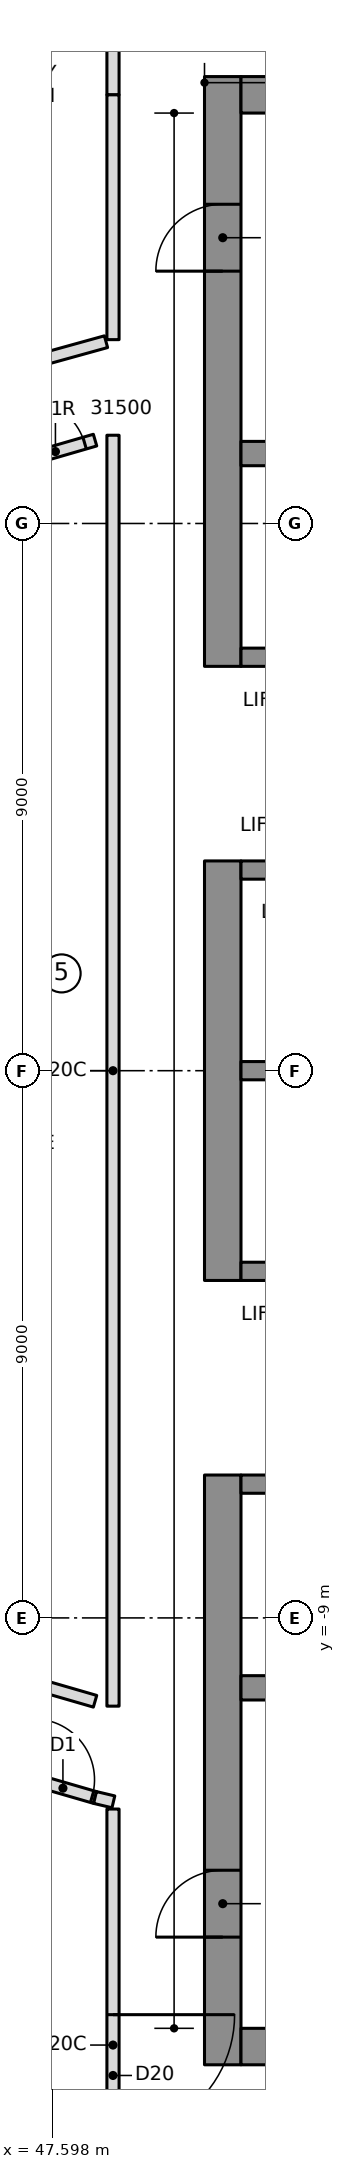
"""IFC4 building model, lengths in metres.
Left out: names, types, materials, properties, quantities, classifications, styles, units other than length and angle.
Written with IfcOpenShell. Run it as: python <this file> out.ifc"""

import sys

from ifc_helpers import new_model, si_unit, direction, frame, frame_2d, origin, place, context, subcontext, project, spatial, rectangle, extrude, element, fill, save


model = new_model("IFC4")
c1 = context("Model", 3, precision=1e-05, world=origin(), true_north=direction((0.0, 1.0)))
c2 = subcontext(c1, "Body", "Model", "MODEL_VIEW")
j1 = project(units=[si_unit("LENGTHUNIT", "METRE"), si_unit("PLANEANGLEUNIT", "RADIAN")], contexts=[c1])
p1 = place(None, origin())
s1 = spatial("IfcSite", under=j1, at=p1, CompositionType="ELEMENT")
p2 = place(p1, origin())
s2 = spatial("IfcBuilding", under=s1, at=p2, CompositionType="ELEMENT")
p3 = place(p2, frame((0.0, 0.0, 216.2)))
s3 = spatial("IfcBuildingStorey", under=s2, at=p3, CompositionType="ELEMENT", Elevation=216.2)
p4 = place(p3, frame((50.4, 6.65, 0.0), z_axis=(0.0, 0.0, 1.0), x_axis=(0.0, 1.0, 0.0)))
e1 = element("IfcWall", 1, at=p4, inside=s3, PredefinedType="SHEAR", context=c2, shape_type="SweptSolid", body=[
    extrude(rectangle(XDim=9.7, YDim=0.6, at=frame_2d((4.85, 0.0))), origin(), (0.0, 0.0, 1.0), 4.6),
])
p5 = place(p4, frame((6.5, 0.0, 0.0)))
e2 = element("IfcOpeningElement", 2, at=p5, cuts=e1, PredefinedType="OPENING", context=c2, shape_type="SweptSolid", body=[
    extrude(rectangle(XDim=1.1, YDim=2.1, at=frame_2d((0.55, 1.05))), frame((0.0, 0.31, 0.0), z_axis=(0.0, -1.0, 0.0), x_axis=(1.0, 0.0, 0.0)), (0.0, 0.0, 1.0), 0.62),
])
p6 = place(p3, frame((50.4, -3.45, 0.0), z_axis=(0.0, 0.0, 1.0), x_axis=(0.0, 1.0, 0.0)))
e3 = element("IfcWall", 3, at=p6, inside=s3, PredefinedType="SHEAR", context=c2, shape_type="SweptSolid", body=[
    extrude(rectangle(XDim=6.9, YDim=0.6, at=frame_2d((3.45, 0.0))), origin(), (0.0, 0.0, 1.0), 4.6),
])
p7 = place(p3, frame((50.4, -16.35, 0.0), z_axis=(0.0, 0.0, 1.0), x_axis=(0.0, 1.0, 0.0)))
e4 = element("IfcWall", 4, at=p7, inside=s3, PredefinedType="SHEAR", context=c2, shape_type="SweptSolid", body=[
    extrude(rectangle(XDim=9.7, YDim=0.6, at=frame_2d((4.85, 0.0))), origin(), (0.0, 0.0, 1.0), 4.6),
])
p8 = place(p7, frame((2.1, 0.0, 0.0)))
e5 = element("IfcOpeningElement", 5, at=p8, cuts=e4, PredefinedType="OPENING", context=c2, shape_type="SweptSolid", body=[
    extrude(rectangle(XDim=1.1, YDim=2.1, at=frame_2d((0.55, 1.05))), frame((0.0, 0.31, 0.0), z_axis=(0.0, -1.0, 0.0), x_axis=(1.0, 0.0, 0.0)), (0.0, 0.0, 1.0), 0.62),
])
for number, where, z_axis, x_axis in (
    (6, (50.7, 16.05, 0.0), (0.0, 0.0, 1.0), (1.0, 0.0, 0.0)),
    (7, (50.7, -16.05, 0.0), (0.0, 0.0, 1.0), (1.0, 0.0, 0.0)),
):
    element("IfcWall", number, at=place(p3, frame(where, z_axis=z_axis, x_axis=x_axis)), inside=s3, PredefinedType="SHEAR", context=c2, shape_type="SweptSolid", body=[
        extrude(rectangle(XDim=13.62, YDim=0.6, at=frame_2d((6.81, 0.0))), origin(), (0.0, 0.0, 1.0), 4.6),
    ])
p9 = place(p3, frame((50.7, 10.15, 0.0), z_axis=(0.0, 0.0, 1.0), x_axis=(1.0, 0.0, 0.0)))
e8 = element("IfcWall", 8, at=p9, inside=s3, PredefinedType="SHEAR", context=c2, shape_type="SweptSolid", body=[
    extrude(rectangle(XDim=13.02, YDim=0.4, at=frame_2d((6.51, 0.0))), origin(), (0.0, 0.0, 1.0), 4.6),
])
p10 = place(p9, frame((0.7, 0.0, 0.0)))
e9 = element("IfcOpeningElement", 9, at=p10, cuts=e8, PredefinedType="OPENING", context=c2, shape_type="SweptSolid", body=[
    extrude(rectangle(XDim=1.1, YDim=2.1, at=frame_2d((0.55, 1.05))), frame((0.0, 0.21, 0.0), z_axis=(0.0, -1.0, 0.0), x_axis=(1.0, 0.0, 0.0)), (0.0, 0.0, 1.0), 0.42),
])
p11 = place(p9, frame((3.5, 0.0, 0.0)))
e10 = element("IfcOpeningElement", 10, at=p11, cuts=e8, PredefinedType="OPENING", context=c2, shape_type="SweptSolid", body=[
    extrude(rectangle(XDim=1.1, YDim=2.1, at=frame_2d((0.55, 1.05))), frame((0.0, 0.21, 0.0), z_axis=(0.0, -1.0, 0.0), x_axis=(1.0, 0.0, 0.0)), (0.0, 0.0, 1.0), 0.42),
])
p12 = place(p3, frame((50.7, -10.15, 0.0), z_axis=(0.0, 0.0, 1.0), x_axis=(1.0, 0.0, 0.0)))
e11 = element("IfcWall", 11, at=p12, inside=s3, PredefinedType="SHEAR", context=c2, shape_type="SweptSolid", body=[
    extrude(rectangle(XDim=13.02, YDim=0.4, at=frame_2d((6.51, 0.0))), origin(), (0.0, 0.0, 1.0), 4.6),
])
p13 = place(p3, frame((50.7, 0.0, 0.0), z_axis=(0.0, 0.0, 1.0), x_axis=(1.0, 0.0, 0.0)))
e12 = element("IfcWall", 12, at=p13, inside=s3, PredefinedType="SHEAR", context=c2, shape_type="SweptSolid", body=[
    extrude(rectangle(XDim=10.9, YDim=0.3, at=frame_2d((5.45, 0.0))), origin(), (0.0, 0.0, 1.0), 4.6),
])
p14 = place(p3, frame((50.7, 3.3, 0.0), z_axis=(0.0, 0.0, 1.0), x_axis=(1.0, 0.0, 0.0)))
e13 = element("IfcWall", 13, at=p14, inside=s3, PredefinedType="SHEAR", context=c2, shape_type="SweptSolid", body=[
    extrude(rectangle(XDim=10.9, YDim=0.3, at=frame_2d((5.45, 0.0))), origin(), (0.0, 0.0, 1.0), 4.6),
])
p15 = place(p14, frame((0.7, 0.0, 0.0)))
e14 = element("IfcOpeningElement", 14, at=p15, cuts=e13, PredefinedType="OPENING", context=c2, shape_type="SweptSolid", body=[
    extrude(rectangle(XDim=1.1, YDim=2.1, at=frame_2d((0.55, 1.05))), frame((0.0, 0.16, 0.0), z_axis=(0.0, -1.0, 0.0), x_axis=(1.0, 0.0, 0.0)), (0.0, 0.0, 1.0), 0.32),
])
p16 = place(p14, frame((3.5, 0.0, 0.0)))
e15 = element("IfcOpeningElement", 15, at=p16, cuts=e13, PredefinedType="OPENING", context=c2, shape_type="SweptSolid", body=[
    extrude(rectangle(XDim=1.1, YDim=2.1, at=frame_2d((0.55, 1.05))), frame((0.0, 0.16, 0.0), z_axis=(0.0, -1.0, 0.0), x_axis=(1.0, 0.0, 0.0)), (0.0, 0.0, 1.0), 0.32),
])
p17 = place(p14, frame((6.3, 0.0, 0.0)))
e16 = element("IfcOpeningElement", 16, at=p17, cuts=e13, PredefinedType="OPENING", context=c2, shape_type="SweptSolid", body=[
    extrude(rectangle(XDim=1.1, YDim=2.1, at=frame_2d((0.55, 1.05))), frame((0.0, 0.16, 0.0), z_axis=(0.0, -1.0, 0.0), x_axis=(1.0, 0.0, 0.0)), (0.0, 0.0, 1.0), 0.32),
])
p18 = place(p14, frame((9.1, 0.0, 0.0)))
e17 = element("IfcOpeningElement", 17, at=p18, cuts=e13, PredefinedType="OPENING", context=c2, shape_type="SweptSolid", body=[
    extrude(rectangle(XDim=1.1, YDim=2.1, at=frame_2d((0.55, 1.05))), frame((0.0, 0.16, 0.0), z_axis=(0.0, -1.0, 0.0), x_axis=(1.0, 0.0, 0.0)), (0.0, 0.0, 1.0), 0.32),
])
p19 = place(p3, frame((50.7, 6.8, 0.0), z_axis=(0.0, 0.0, 1.0), x_axis=(1.0, 0.0, 0.0)))
e18 = element("IfcWall", 18, at=p19, inside=s3, PredefinedType="SHEAR", context=c2, shape_type="SweptSolid", body=[
    extrude(rectangle(XDim=10.9, YDim=0.3, at=frame_2d((5.45, 0.0))), origin(), (0.0, 0.0, 1.0), 4.6),
])
p20 = place(p19, frame((6.4, 0.0, 0.0)))
e19 = element("IfcOpeningElement", 19, at=p20, cuts=e18, PredefinedType="OPENING", context=c2, shape_type="SweptSolid", body=[
    extrude(rectangle(XDim=0.9, YDim=2.1, at=frame_2d((0.45, 1.05))), frame((0.0, 0.16, 0.0), z_axis=(0.0, -1.0, 0.0), x_axis=(1.0, 0.0, 0.0)), (0.0, 0.0, 1.0), 0.32),
])
p21 = place(p19, frame((9.2, 0.0, 0.0)))
e20 = element("IfcOpeningElement", 20, at=p21, cuts=e18, PredefinedType="OPENING", context=c2, shape_type="SweptSolid", body=[
    extrude(rectangle(XDim=0.9, YDim=2.1, at=frame_2d((0.45, 1.05))), frame((0.0, 0.16, 0.0), z_axis=(0.0, -1.0, 0.0), x_axis=(1.0, 0.0, 0.0)), (0.0, 0.0, 1.0), 0.32),
])
p22 = place(p3, frame((50.7, -3.3, 0.0), z_axis=(0.0, 0.0, 1.0), x_axis=(1.0, 0.0, 0.0)))
e21 = element("IfcWall", 21, at=p22, inside=s3, PredefinedType="SHEAR", context=c2, shape_type="SweptSolid", body=[
    extrude(rectangle(XDim=10.9, YDim=0.3, at=frame_2d((5.45, 0.0))), origin(), (0.0, 0.0, 1.0), 4.6),
])
p23 = place(p22, frame((9.1, 0.0, 0.0)))
e22 = element("IfcOpeningElement", 22, at=p23, cuts=e21, PredefinedType="OPENING", context=c2, shape_type="SweptSolid", body=[
    extrude(rectangle(XDim=1.1, YDim=2.1, at=frame_2d((0.55, 1.05))), frame((0.0, 0.16, 0.0), z_axis=(0.0, -1.0, 0.0), x_axis=(1.0, 0.0, 0.0)), (0.0, 0.0, 1.0), 0.32),
])
p24 = place(p3, frame((50.7, -6.8, 0.0), z_axis=(0.0, 0.0, 1.0), x_axis=(1.0, 0.0, 0.0)))
e23 = element("IfcWall", 23, at=p24, inside=s3, PredefinedType="SHEAR", context=c2, shape_type="SweptSolid", body=[
    extrude(rectangle(XDim=10.9, YDim=0.3, at=frame_2d((5.45, 0.0))), origin(), (0.0, 0.0, 1.0), 4.6),
])
p25 = place(p24, frame((6.3, 0.0, 0.0)))
e24 = element("IfcOpeningElement", 24, at=p25, cuts=e23, PredefinedType="OPENING", context=c2, shape_type="SweptSolid", body=[
    extrude(rectangle(XDim=1.1, YDim=2.1, at=frame_2d((0.55, 1.05))), frame((0.0, 0.16, 0.0), z_axis=(0.0, -1.0, 0.0), x_axis=(1.0, 0.0, 0.0)), (0.0, 0.0, 1.0), 0.32),
])
p26 = place(p24, frame((9.1, 0.0, 0.0)))
e25 = element("IfcOpeningElement", 25, at=p26, cuts=e23, PredefinedType="OPENING", context=c2, shape_type="SweptSolid", body=[
    extrude(rectangle(XDim=1.1, YDim=2.1, at=frame_2d((0.55, 1.05))), frame((0.0, 0.16, 0.0), z_axis=(0.0, -1.0, 0.0), x_axis=(1.0, 0.0, 0.0)), (0.0, 0.0, 1.0), 0.32),
])
p27 = place(p24, frame((0.8, 0.0, 0.0)))
e26 = element("IfcOpeningElement", 26, at=p27, cuts=e23, PredefinedType="OPENING", context=c2, shape_type="SweptSolid", body=[
    extrude(rectangle(XDim=0.9, YDim=2.1, at=frame_2d((0.45, 1.05))), frame((0.0, 0.16, 0.0), z_axis=(0.0, -1.0, 0.0), x_axis=(1.0, 0.0, 0.0)), (0.0, 0.0, 1.0), 0.32),
])
p28 = place(p24, frame((3.6, 0.0, 0.0)))
e27 = element("IfcOpeningElement", 27, at=p28, cuts=e23, PredefinedType="OPENING", context=c2, shape_type="SweptSolid", body=[
    extrude(rectangle(XDim=0.9, YDim=2.1, at=frame_2d((0.45, 1.05))), frame((0.0, 0.16, 0.0), z_axis=(0.0, -1.0, 0.0), x_axis=(1.0, 0.0, 0.0)), (0.0, 0.0, 1.0), 0.32),
])
p29 = place(p3, frame((47.23, -11.643, 0.0), z_axis=(0.0, 0.0, 1.0), x_axis=(0.960450233741, -0.278451698696, 0.0)))
e28 = element("IfcWall", 28, at=p29, inside=s3, PredefinedType="PARTITIONING", context=c2, shape_type="SweptSolid", body=[
    extrude(rectangle(XDim=1.115, YDim=0.2, at=frame_2d((0.557, 0.0))), origin(), (0.0, 0.0, 1.0), 4.3),
])
p30 = place(p29, frame((0.064, 0.0, 0.0)))
e29 = element("IfcOpeningElement", 29, at=p30, cuts=e28, PredefinedType="OPENING", context=c2, shape_type="SweptSolid", body=[
    extrude(rectangle(XDim=1.0, YDim=2.1, at=frame_2d((0.5, 1.05))), frame((0.0, 0.11, 0.0), z_axis=(0.0, -1.0, 0.0), x_axis=(1.0, 0.0, 0.0)), (0.0, 0.0, 1.0), 0.22),
])
p31 = place(p3, frame((46.997, 9.993, 0.0), z_axis=(0.0, 0.0, 1.0), x_axis=(0.960450321583, 0.278451395706, 0.0)))
e30 = element("IfcWall", 30, at=p31, inside=s3, PredefinedType="PARTITIONING", context=c2, shape_type="SweptSolid", body=[
    extrude(rectangle(XDim=1.356, YDim=0.2, at=frame_2d((0.678, 0.0))), origin(), (0.0, 0.0, 1.0), 4.3),
])
p32 = place(p31, frame((0.178, 0.0, 0.0)))
e31 = element("IfcOpeningElement", 31, at=p32, cuts=e30, PredefinedType="OPENING", context=c2, shape_type="SweptSolid", body=[
    extrude(rectangle(XDim=1.0, YDim=2.1, at=frame_2d((0.5, 1.05))), frame((0.0, 0.11, 0.0), z_axis=(0.0, -1.0, 0.0), x_axis=(1.0, 0.0, 0.0)), (0.0, 0.0, 1.0), 0.22),
])
p33 = place(p3, frame((48.3, -10.371, 0.0), z_axis=(0.0, 0.0, 1.0), x_axis=(-0.960450321583, 0.278451395706, 0.0)))
e32 = element("IfcWall", 32, at=p33, inside=s3, PredefinedType="PARTITIONING", context=c2, shape_type="SweptSolid", body=[
    extrude(rectangle(XDim=1.356, YDim=0.2, at=frame_2d((0.678, 0.0))), origin(), (0.0, 0.0, 1.0), 4.3),
])
p34 = place(p3, frame((48.595, 19.927, 0.0), z_axis=(0.0, 0.0, 1.0), x_axis=(0.0, -1.0, 0.0)))
e33 = element("IfcWall", 33, at=p34, inside=s3, PredefinedType="PARTITIONING", context=c2, shape_type="SweptSolid", body=[
    extrude(rectangle(XDim=3.877, YDim=0.2, at=frame_2d((1.938, 0.0))), origin(), (0.0, 0.0, 1.0), 4.3),
])
p35 = place(p34, frame((1.601, 0.0, 0.0)))
e34 = element("IfcOpeningElement", 34, at=p35, cuts=e33, PredefinedType="OPENING", context=c2, shape_type="SweptSolid", body=[
    extrude(rectangle(XDim=1.0, YDim=2.1, at=frame_2d((0.5, 1.05))), frame((0.0, 0.11, 0.0), z_axis=(0.0, -1.0, 0.0), x_axis=(1.0, 0.0, 0.0)), (0.0, 0.0, 1.0), 0.22),
])
p36 = place(p3, frame((48.595, 10.451, 0.0), z_axis=(0.0, 0.0, 1.0), x_axis=(0.0, -1.0, 0.0)))
e35 = element("IfcWall", 35, at=p36, inside=s3, PredefinedType="PARTITIONING", context=c2, shape_type="SweptSolid", body=[
    extrude(rectangle(XDim=20.903, YDim=0.2, at=frame_2d((10.451, 0.0))), origin(), (0.0, 0.0, 1.0), 4.3),
])
p37 = place(p3, frame((48.595, 16.05, 0.0), z_axis=(0.0, 0.0, 1.0), x_axis=(0.0, -1.0, 0.0)))
e36 = element("IfcWall", 36, at=p37, inside=s3, PredefinedType="PARTITIONING", context=c2, shape_type="SweptSolid", body=[
    extrude(rectangle(XDim=4.026, YDim=0.2, at=frame_2d((2.013, 0.0))), origin(), (0.0, 0.0, 1.0), 4.3),
])
p38 = place(p3, frame((48.48, 11.99, 0.0), z_axis=(0.0, 0.0, 1.0), x_axis=(-0.963687566022, -0.267032348406, 0.0)))
e37 = element("IfcWall", 37, at=p38, inside=s3, PredefinedType="PARTITIONING", context=c2, shape_type="SweptSolid", body=[
    extrude(rectangle(XDim=1.297, YDim=0.2, at=frame_2d((0.649, 0.0))), origin(), (0.0, 0.0, 1.0), 4.3),
])
p39 = place(p3, frame((48.3, -11.954, 0.0), z_axis=(0.0, 0.0, 1.0), x_axis=(0.972991873737, -0.230839367615, 0.0)))
e38 = element("IfcWall", 38, at=p39, inside=s3, PredefinedType="PARTITIONING", context=c2, shape_type="SweptSolid", body=[
    extrude(rectangle(XDim=0.31, YDim=0.2, at=frame_2d((0.155, 0.0))), origin(), (0.0, 0.0, 1.0), 4.3),
])
p40 = place(p3, frame((48.595, -12.144, 0.0), z_axis=(0.0, 0.0, 1.0), x_axis=(0.0, -1.0, 0.0)))
e39 = element("IfcWall", 39, at=p40, inside=s3, PredefinedType="PARTITIONING", context=c2, shape_type="SweptSolid", body=[
    extrude(rectangle(XDim=7.763, YDim=0.2, at=frame_2d((3.882, 0.0))), origin(), (0.0, 0.0, 1.0), 4.3),
])
p41 = place(p40, frame((3.382, 0.0, 0.0)))
e40 = element("IfcOpeningElement", 40, at=p41, cuts=e39, PredefinedType="OPENING", context=c2, shape_type="SweptSolid", body=[
    extrude(rectangle(XDim=2.0, YDim=2.4, at=frame_2d((1.0, 1.2))), frame((0.0, 0.11, 0.0), z_axis=(0.0, -1.0, 0.0), x_axis=(1.0, 0.0, 0.0)), (0.0, 0.0, 1.0), 0.22),
])
p42 = place(p30, origin())
e41 = element("IfcDoor", 41, at=p42, inside=s3, OperationType="SINGLE_SWING_LEFT", PredefinedType="DOOR", context=c2, shape_type="SweptSolid", body=[
    extrude(rectangle(XDim=1.0, YDim=2.1, at=frame_2d((0.5, 1.05))), frame((0.0, 0.025, 0.0), z_axis=(0.0, -1.0, 0.0), x_axis=(1.0, 0.0, 0.0)), (0.0, 0.0, 1.0), 0.05),
])
fill(e29, e41)
p43 = place(p32, origin())
e42 = element("IfcDoor", 42, at=p43, inside=s3, OperationType="SINGLE_SWING_RIGHT", PredefinedType="DOOR", context=c2, shape_type="SweptSolid", body=[
    extrude(rectangle(XDim=1.0, YDim=2.1, at=frame_2d((0.5, 1.05))), frame((0.0, 0.025, 0.0), z_axis=(0.0, -1.0, 0.0), x_axis=(1.0, 0.0, 0.0)), (0.0, 0.0, 1.0), 0.05),
])
fill(e31, e42)
p44 = place(p41, origin())
e43 = element("IfcDoor", 43, at=p44, inside=s3, OperationType="DOUBLE_DOOR_SINGLE_SWING", PredefinedType="DOOR", context=c2, shape_type="SweptSolid", body=[
    extrude(rectangle(XDim=2.0, YDim=2.4, at=frame_2d((1.0, 1.2))), frame((0.0, 0.025, 0.0), z_axis=(0.0, -1.0, 0.0), x_axis=(1.0, 0.0, 0.0)), (0.0, 0.0, 1.0), 0.05),
])
fill(e40, e43)
p45 = place(p5, origin())
e44 = element("IfcDoor", 44, at=p45, inside=s3, OperationType="SINGLE_SWING_RIGHT", PredefinedType="DOOR", context=c2, shape_type="SweptSolid", body=[
    extrude(rectangle(XDim=1.1, YDim=2.1, at=frame_2d((0.55, 1.05))), frame((0.0, 0.025, 0.0), z_axis=(0.0, -1.0, 0.0), x_axis=(1.0, 0.0, 0.0)), (0.0, 0.0, 1.0), 0.05),
])
fill(e2, e44)
p46 = place(p8, origin())
e45 = element("IfcDoor", 45, at=p46, inside=s3, OperationType="SINGLE_SWING_RIGHT", PredefinedType="DOOR", context=c2, shape_type="SweptSolid", body=[
    extrude(rectangle(XDim=1.1, YDim=2.1, at=frame_2d((0.55, 1.05))), frame((0.0, 0.025, 0.0), z_axis=(0.0, -1.0, 0.0), x_axis=(1.0, 0.0, 0.0)), (0.0, 0.0, 1.0), 0.05),
])
fill(e5, e45)
save(model, sys.argv[1])
